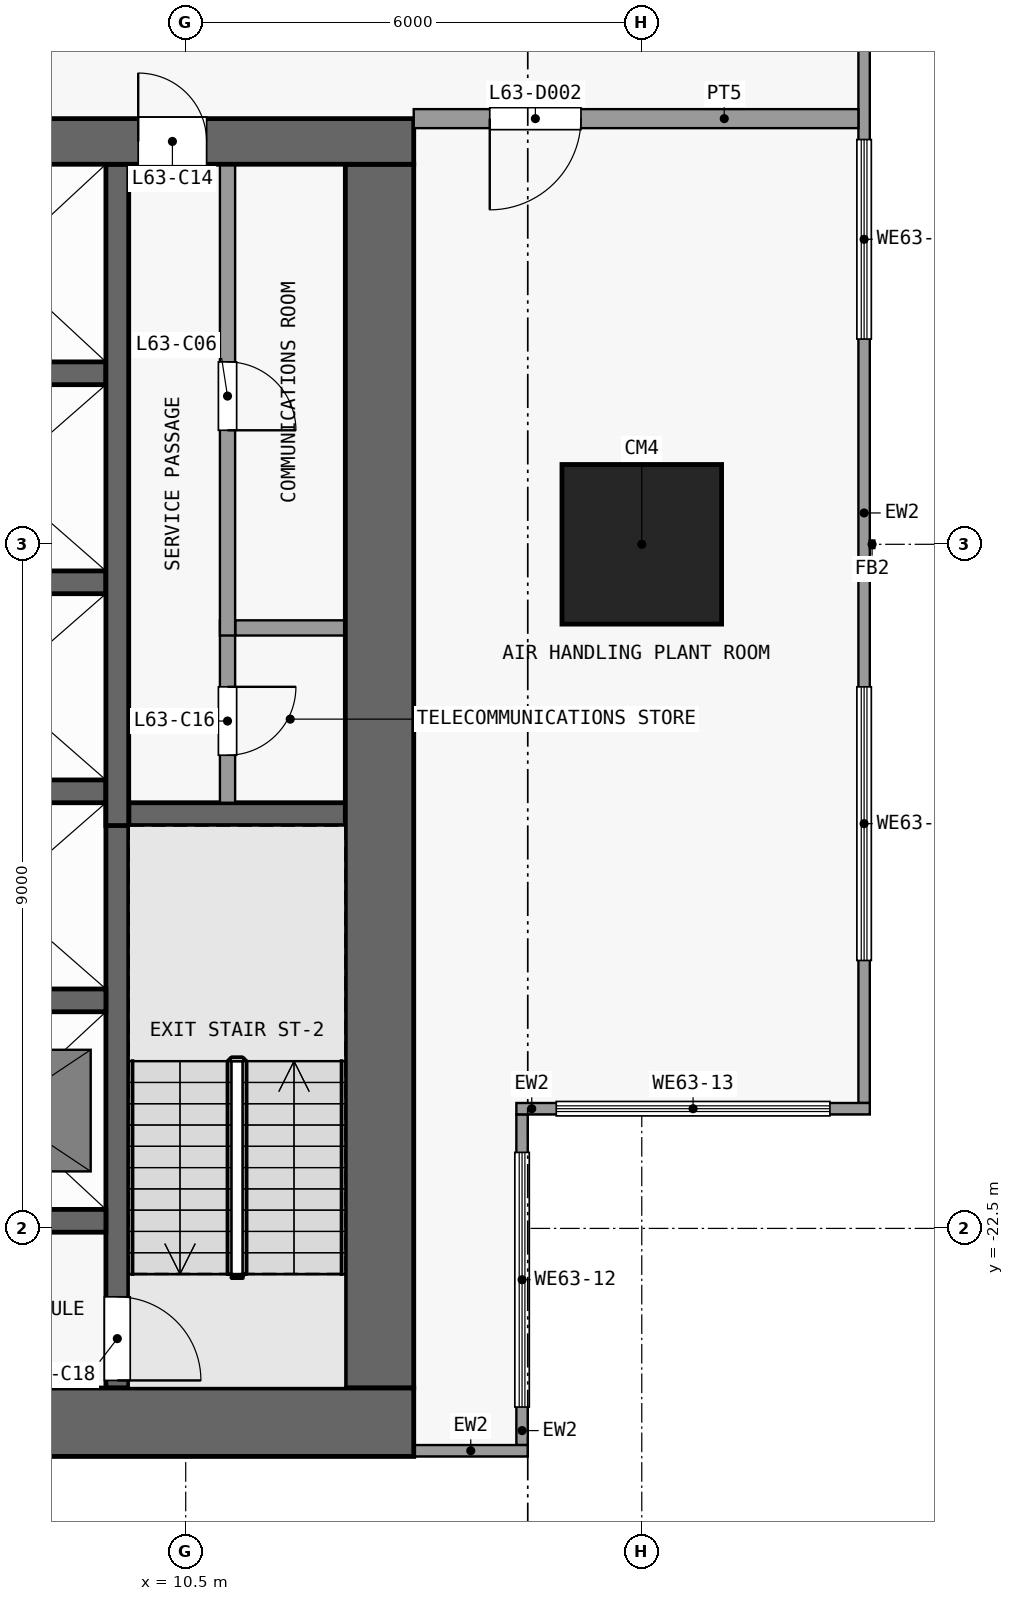
"""IFC4 building model, lengths in metres.
Left out: names, types, materials, properties, quantities, classifications, styles, units other than length and angle.
Written with IfcOpenShell. Run it as: python <this file> out.ifc"""

import sys

from ifc_helpers import new_model, si_unit, direction, frame, frame_2d, origin, origin_2d, place, context, subcontext, project, spatial, rectangle, extrude, element, fill, save


model = new_model("IFC4")
c1 = context("Model", 3, precision=1e-05, world=origin(), true_north=direction((0.0, 1.0)))
c2 = subcontext(c1, "Body", "Model", "MODEL_VIEW")
j1 = project(units=[si_unit("LENGTHUNIT", "METRE"), si_unit("PLANEANGLEUNIT", "RADIAN")], contexts=[c1])
p1 = place(None, origin())
s1 = spatial("IfcSite", under=j1, at=p1, CompositionType="ELEMENT")
p2 = place(p1, origin())
s2 = spatial("IfcBuilding", under=s1, at=p2, CompositionType="ELEMENT")
p3 = place(p2, frame((0.0, 0.0, 248.3)))
s3 = spatial("IfcBuildingStorey", under=s2, at=p3, CompositionType="ELEMENT", Elevation=248.3)
p4 = place(p3, frame((16.5, -13.5, 0.0), z_axis=(0.0, 0.0, 1.0), x_axis=(1.0, 0.0, 0.0)))
e1 = element("IfcColumn", 1, at=p4, inside=s3, PredefinedType="COLUMN", context=c2, shape_type="SweptSolid", body=[
    extrude(rectangle(XDim=2.1, YDim=2.1, at=origin_2d()), origin(), (0.0, 0.0, 1.0), 7.2),
])
p5 = place(p3, frame((-13.5, -25.05, 0.0), z_axis=(0.0, 0.0, 1.0), x_axis=(1.0, 0.0, 0.0)))
e2 = element("IfcWall", 2, at=p5, inside=s3, PredefinedType="SHEAR", context=c2, shape_type="SweptSolid", body=[
    extrude(rectangle(XDim=27.0, YDim=0.9, at=frame_2d((13.5, 0.0))), origin(), (0.0, 0.0, 1.0), 6.9),
])
p6 = place(p3, frame((-13.5, -8.2, 0.0), z_axis=(0.0, 0.0, 1.0), x_axis=(1.0, 0.0, 0.0)))
e3 = element("IfcWall", 3, at=p6, inside=s3, PredefinedType="SHEAR", context=c2, shape_type="SweptSolid", body=[
    extrude(rectangle(XDim=27.0, YDim=0.6, at=frame_2d((13.5, 0.0))), origin(), (0.0, 0.0, 1.0), 6.9),
])
p7 = place(p6, frame((7.8, 0.0, 0.0)))
e4 = element("IfcOpeningElement", 4, at=p7, cuts=e3, PredefinedType="OPENING", context=c2, shape_type="SweptSolid", body=[
    extrude(rectangle(XDim=1.8, YDim=2.1, at=frame_2d((0.9, 1.05))), frame((0.0, 0.31, 0.0), z_axis=(0.0, -1.0, 0.0), x_axis=(1.0, 0.0, 0.0)), (0.0, 0.0, 1.0), 0.62),
])
p8 = place(p6, frame((17.4, 0.0, 0.0)))
e5 = element("IfcOpeningElement", 5, at=p8, cuts=e3, PredefinedType="OPENING", context=c2, shape_type="SweptSolid", body=[
    extrude(rectangle(XDim=1.8, YDim=2.1, at=frame_2d((0.9, 1.05))), frame((0.0, 0.31, 0.0), z_axis=(0.0, -1.0, 0.0), x_axis=(1.0, 0.0, 0.0)), (0.0, 0.0, 1.0), 0.62),
])
p9 = place(p6, frame((1.725, 0.0, 0.0)))
e6 = element("IfcOpeningElement", 6, at=p9, cuts=e3, PredefinedType="OPENING", context=c2, shape_type="SweptSolid", body=[
    extrude(rectangle(XDim=1.2, YDim=2.1, at=frame_2d((0.6, 1.05))), frame((0.0, 0.31, 0.0), z_axis=(0.0, -1.0, 0.0), x_axis=(1.0, 0.0, 0.0)), (0.0, 0.0, 1.0), 0.62),
])
p10 = place(p6, frame((23.375, 0.0, 0.0)))
e7 = element("IfcOpeningElement", 7, at=p10, cuts=e3, PredefinedType="OPENING", context=c2, shape_type="SweptSolid", body=[
    extrude(rectangle(XDim=0.9, YDim=2.1, at=frame_2d((0.45, 1.05))), frame((0.0, 0.31, 0.0), z_axis=(0.0, -1.0, 0.0), x_axis=(1.0, 0.0, 0.0)), (0.0, 0.0, 1.0), 0.62),
])
p11 = place(p3, frame((13.05, -24.6, 0.0), z_axis=(0.0, 0.0, 1.0), x_axis=(0.0, 1.0, 0.0)))
e8 = element("IfcWall", 8, at=p11, inside=s3, PredefinedType="SHEAR", context=c2, shape_type="SweptSolid", body=[
    extrude(rectangle(XDim=16.1, YDim=0.9, at=frame_2d((8.05, 0.0))), origin(), (0.0, 0.0, 1.0), 6.9),
])
for number, where, z_axis, x_axis in (
    (9, (6.65, -22.4, 0.0), (0.0, 0.0, 1.0), (1.0, 0.0, 0.0)),
    (10, (6.65, -19.5, 0.0), (0.0, 0.0, 1.0), (1.0, 0.0, 0.0)),
):
    element("IfcWall", number, at=place(p3, frame(where, z_axis=z_axis, x_axis=x_axis)), inside=s3, PredefinedType="SHEAR", context=c2, shape_type="SweptSolid", body=[
        extrude(rectangle(XDim=2.8, YDim=0.3, at=frame_2d((1.4, 0.0))), origin(), (0.0, 0.0, 1.0), 6.9),
    ])
p12 = place(p3, frame((9.75, -17.05, 0.0), z_axis=(0.0, 0.0, 1.0), x_axis=(1.0, 0.0, 0.0)))
e11 = element("IfcWall", 11, at=p12, inside=s3, PredefinedType="SHEAR", context=c2, shape_type="SweptSolid", body=[
    extrude(rectangle(XDim=2.85, YDim=0.3, at=frame_2d((1.425, 0.0))), origin(), (0.0, 0.0, 1.0), 6.9),
])
p13 = place(p3, frame((6.65, -16.75, 0.0), z_axis=(0.0, 0.0, 1.0), x_axis=(1.0, 0.0, 0.0)))
e12 = element("IfcWall", 12, at=p13, inside=s3, PredefinedType="SHEAR", context=c2, shape_type="SweptSolid", body=[
    extrude(rectangle(XDim=2.8, YDim=0.3, at=frame_2d((1.4, 0.0))), origin(), (0.0, 0.0, 1.0), 6.9),
])
p14 = place(p3, frame((11.15, -14.6, 0.0), z_axis=(0.0, 0.0, 1.0), x_axis=(1.0, 0.0, 0.0)))
e13 = element("IfcWall", 13, at=p14, inside=s3, PredefinedType="PARTITIONING", context=c2, shape_type="SweptSolid", body=[
    extrude(rectangle(XDim=1.45, YDim=0.2, at=frame_2d((0.725, 0.0))), origin(), (0.0, 0.0, 1.0), 6.9),
])
for number, where, z_axis, x_axis in (
    (14, (6.65, -14.0, 0.0), (0.0, 0.0, 1.0), (1.0, 0.0, 0.0)),
    (15, (6.65, -11.25, 0.0), (0.0, 0.0, 1.0), (1.0, 0.0, 0.0)),
):
    element("IfcWall", number, at=place(p3, frame(where, z_axis=z_axis, x_axis=x_axis)), inside=s3, PredefinedType="SHEAR", context=c2, shape_type="SweptSolid", body=[
        extrude(rectangle(XDim=2.8, YDim=0.3, at=frame_2d((1.4, 0.0))), origin(), (0.0, 0.0, 1.0), 6.9),
    ])
p15 = place(p3, frame((9.6, -16.9, 0.0), z_axis=(0.0, 0.0, 1.0), x_axis=(0.0, -1.0, 0.0)))
e16 = element("IfcWall", 16, at=p15, inside=s3, PredefinedType="SHEAR", context=c2, shape_type="SweptSolid", body=[
    extrude(rectangle(XDim=7.7, YDim=0.3, at=frame_2d((3.85, 0.0))), origin(), (0.0, 0.0, 1.0), 6.9),
])
p16 = place(p15, frame((6.5, 0.0, 0.0)))
e17 = element("IfcOpeningElement", 17, at=p16, cuts=e16, PredefinedType="OPENING", context=c2, shape_type="SweptSolid", body=[
    extrude(rectangle(XDim=1.1, YDim=2.1, at=frame_2d((0.55, 1.05))), frame((0.0, 0.16, 0.0), z_axis=(0.0, -1.0, 0.0), x_axis=(1.0, 0.0, 0.0)), (0.0, 0.0, 1.0), 0.32),
])
p17 = place(p3, frame((9.6, -17.2, 0.0), z_axis=(0.0, 0.0, 1.0), x_axis=(0.0, 1.0, 0.0)))
e18 = element("IfcWall", 18, at=p17, inside=s3, PredefinedType="SHEAR", context=c2, shape_type="SweptSolid", body=[
    extrude(rectangle(XDim=8.7, YDim=0.3, at=frame_2d((4.35, 0.0))), origin(), (0.0, 0.0, 1.0), 6.9),
])
p18 = place(p3, frame((11.05, -14.5, 0.0), z_axis=(0.0, 0.0, 1.0), x_axis=(0.0, -1.0, 0.0)))
e19 = element("IfcWall", 19, at=p18, inside=s3, PredefinedType="PARTITIONING", context=c2, shape_type="SweptSolid", body=[
    extrude(rectangle(XDim=2.4, YDim=0.2, at=frame_2d((1.2, 0.0))), origin(), (0.0, 0.0, 1.0), 6.9),
])
p19 = place(p18, frame((0.875, 0.0, 0.0)))
e20 = element("IfcOpeningElement", 20, at=p19, cuts=e19, PredefinedType="OPENING", context=c2, shape_type="SweptSolid", body=[
    extrude(rectangle(XDim=0.9, YDim=2.1, at=frame_2d((0.45, 1.05))), frame((0.0, 0.11, 0.0), z_axis=(0.0, -1.0, 0.0), x_axis=(1.0, 0.0, 0.0)), (0.0, 0.0, 1.0), 0.22),
])
p20 = place(p3, frame((11.05, -8.5, 0.0), z_axis=(0.0, 0.0, 1.0), x_axis=(0.0, -1.0, 0.0)))
e21 = element("IfcWall", 21, at=p20, inside=s3, PredefinedType="PARTITIONING", context=c2, shape_type="SweptSolid", body=[
    extrude(rectangle(XDim=6.2, YDim=0.2, at=frame_2d((3.1, 0.0))), origin(), (0.0, 0.0, 1.0), 6.9),
])
p21 = place(p20, frame((2.6, 0.0, 0.0)))
e22 = element("IfcOpeningElement", 22, at=p21, cuts=e21, PredefinedType="OPENING", context=c2, shape_type="SweptSolid", body=[
    extrude(rectangle(XDim=0.9, YDim=2.1, at=frame_2d((0.45, 1.05))), frame((0.0, 0.11, 0.0), z_axis=(0.0, -1.0, 0.0), x_axis=(1.0, 0.0, 0.0)), (0.0, 0.0, 1.0), 0.22),
])
p22 = place(p3, frame((19.425, -4.5, 0.0), z_axis=(0.0, 0.0, 1.0), x_axis=(0.0, -1.0, 0.0)))
e23 = element("IfcWall", 23, at=p22, inside=s3, PredefinedType="SOLIDWALL", context=c2, shape_type="SweptSolid", body=[
    extrude(rectangle(XDim=16.35, YDim=0.15, at=frame_2d((8.175, 0.0))), origin(), (0.0, 0.0, 1.0), 6.9),
])
p23 = place(p22, frame((10.875, 0.0, 1.2)))
e24 = element("IfcOpeningElement", 24, at=p23, cuts=e23, PredefinedType="OPENING", context=c2, shape_type="SweptSolid", body=[
    extrude(rectangle(XDim=3.6, YDim=3.0, at=frame_2d((1.8, 1.5))), frame((0.0, 0.085, 0.0), z_axis=(0.0, -1.0, 0.0), x_axis=(1.0, 0.0, 0.0)), (0.0, 0.0, 1.0), 0.17),
])
p24 = place(p22, frame((3.675, 0.0, 1.2)))
e25 = element("IfcOpeningElement", 25, at=p24, cuts=e23, PredefinedType="OPENING", context=c2, shape_type="SweptSolid", body=[
    extrude(rectangle(XDim=2.625, YDim=3.0, at=frame_2d((1.312, 1.5))), frame((0.0, 0.085, 0.0), z_axis=(0.0, -1.0, 0.0), x_axis=(1.0, 0.0, 0.0)), (0.0, 0.0, 1.0), 0.17),
])
p25 = place(p3, frame((15.0, -25.425, 0.0), z_axis=(0.0, 0.0, 1.0), x_axis=(-1.0, 0.0, 0.0)))
e26 = element("IfcWall", 26, at=p25, inside=s3, PredefinedType="SOLIDWALL", context=c2, shape_type="SweptSolid", body=[
    extrude(rectangle(XDim=1.5, YDim=0.15, at=frame_2d((0.75, 0.0))), origin(), (0.0, 0.0, 1.0), 6.9),
])
p26 = place(p3, frame((14.925, -21.0, 0.0), z_axis=(0.0, 0.0, 1.0), x_axis=(0.0, -1.0, 0.0)))
e27 = element("IfcWall", 27, at=p26, inside=s3, PredefinedType="SOLIDWALL", context=c2, shape_type="SweptSolid", body=[
    extrude(rectangle(XDim=4.35, YDim=0.15, at=frame_2d((2.175, 0.0))), origin(), (0.0, 0.0, 1.0), 6.9),
])
p27 = place(p26, frame((0.5, 0.0, 1.2)))
e28 = element("IfcOpeningElement", 28, at=p27, cuts=e27, PredefinedType="OPENING", context=c2, shape_type="SweptSolid", body=[
    extrude(rectangle(XDim=3.35, YDim=3.0, at=frame_2d((1.675, 1.5))), frame((0.0, 0.085, 0.0), z_axis=(0.0, -1.0, 0.0), x_axis=(1.0, 0.0, 0.0)), (0.0, 0.0, 1.0), 0.17),
])
p28 = place(p3, frame((19.5, -20.925, 0.0), z_axis=(0.0, 0.0, 1.0), x_axis=(-1.0, 0.0, 0.0)))
e29 = element("IfcWall", 29, at=p28, inside=s3, PredefinedType="SOLIDWALL", context=c2, shape_type="SweptSolid", body=[
    extrude(rectangle(XDim=4.65, YDim=0.15, at=frame_2d((2.325, 0.0))), origin(), (0.0, 0.0, 1.0), 6.9),
])
p29 = place(p28, frame((0.525, 0.0, 1.2)))
e30 = element("IfcOpeningElement", 30, at=p29, cuts=e29, PredefinedType="OPENING", context=c2, shape_type="SweptSolid", body=[
    extrude(rectangle(XDim=3.6, YDim=3.0, at=frame_2d((1.8, 1.5))), frame((0.0, 0.085, 0.0), z_axis=(0.0, -1.0, 0.0), x_axis=(1.0, 0.0, 0.0)), (0.0, 0.0, 1.0), 0.17),
])
p30 = place(p3, frame((13.5, -7.9, 0.0), z_axis=(0.0, 0.0, 1.0), x_axis=(1.0, 0.0, 0.0)))
e31 = element("IfcWall", 31, at=p30, inside=s3, PredefinedType="PARTITIONING", context=c2, shape_type="SweptSolid", body=[
    extrude(rectangle(XDim=5.85, YDim=0.25, at=frame_2d((2.925, 0.0))), origin(), (0.0, 0.0, 1.0), 6.9),
])
p31 = place(p30, frame((1.0, 0.0, 0.0)))
e32 = element("IfcOpeningElement", 32, at=p31, cuts=e31, PredefinedType="OPENING", context=c2, shape_type="SweptSolid", body=[
    extrude(rectangle(XDim=1.2, YDim=2.1, at=frame_2d((0.6, 1.05))), frame((0.0, 0.135, 0.0), z_axis=(0.0, -1.0, 0.0), x_axis=(1.0, 0.0, 0.0)), (0.0, 0.0, 1.0), 0.27),
])
p32 = place(p21, origin())
e33 = element("IfcDoor", 33, at=p32, inside=s3, OperationType="SINGLE_SWING_RIGHT", PredefinedType="DOOR", context=c2, shape_type="SweptSolid", body=[
    extrude(rectangle(XDim=0.9, YDim=2.1, at=frame_2d((0.45, 1.05))), frame((0.0, 0.025, 0.0), z_axis=(0.0, -1.0, 0.0), x_axis=(1.0, 0.0, 0.0)), (0.0, 0.0, 1.0), 0.05),
])
fill(e22, e33)
p33 = place(p10, origin())
e34 = element("IfcDoor", 34, at=p33, inside=s3, OperationType="SINGLE_SWING_LEFT", PredefinedType="DOOR", context=c2, shape_type="SweptSolid", body=[
    extrude(rectangle(XDim=0.9, YDim=2.1, at=frame_2d((0.45, 1.05))), frame((0.0, 0.025, 0.0), z_axis=(0.0, -1.0, 0.0), x_axis=(1.0, 0.0, 0.0)), (0.0, 0.0, 1.0), 0.05),
])
fill(e7, e34)
p34 = place(p19, origin())
e35 = element("IfcDoor", 35, at=p34, inside=s3, OperationType="SINGLE_SWING_LEFT", PredefinedType="DOOR", context=c2, shape_type="SweptSolid", body=[
    extrude(rectangle(XDim=0.9, YDim=2.1, at=frame_2d((0.45, 1.05))), frame((0.0, 0.025, 0.0), z_axis=(0.0, -1.0, 0.0), x_axis=(1.0, 0.0, 0.0)), (0.0, 0.0, 1.0), 0.05),
])
fill(e20, e35)
p35 = place(p16, origin())
e36 = element("IfcDoor", 36, at=p35, inside=s3, OperationType="SINGLE_SWING_RIGHT", PredefinedType="DOOR", context=c2, shape_type="SweptSolid", body=[
    extrude(rectangle(XDim=1.1, YDim=2.1, at=frame_2d((0.55, 1.05))), frame((0.0, 0.025, 0.0), z_axis=(0.0, -1.0, 0.0), x_axis=(1.0, 0.0, 0.0)), (0.0, 0.0, 1.0), 0.05),
])
fill(e17, e36)
p36 = place(p23, origin())
e37 = element("IfcWindow", 37, at=p36, inside=s3, PartitioningType="SINGLE_PANEL", PredefinedType="WINDOW", context=c2, shape_type="SweptSolid", body=[
    extrude(rectangle(XDim=3.6, YDim=3.0, at=frame_2d((1.8, 1.5))), frame((0.0, 0.03, 0.0), z_axis=(0.0, -1.0, 0.0), x_axis=(1.0, 0.0, 0.0)), (0.0, 0.0, 1.0), 0.06),
])
fill(e24, e37)
p37 = place(p24, origin())
e38 = element("IfcWindow", 38, at=p37, inside=s3, PartitioningType="SINGLE_PANEL", PredefinedType="WINDOW", context=c2, shape_type="SweptSolid", body=[
    extrude(rectangle(XDim=2.625, YDim=3.0, at=frame_2d((1.312, 1.5))), frame((0.0, 0.03, 0.0), z_axis=(0.0, -1.0, 0.0), x_axis=(1.0, 0.0, 0.0)), (0.0, 0.0, 1.0), 0.06),
])
fill(e25, e38)
p38 = place(p27, origin())
e39 = element("IfcWindow", 39, at=p38, inside=s3, PartitioningType="SINGLE_PANEL", PredefinedType="WINDOW", context=c2, shape_type="SweptSolid", body=[
    extrude(rectangle(XDim=3.35, YDim=3.0, at=frame_2d((1.675, 1.5))), frame((0.0, 0.03, 0.0), z_axis=(0.0, -1.0, 0.0), x_axis=(1.0, 0.0, 0.0)), (0.0, 0.0, 1.0), 0.06),
])
fill(e28, e39)
p39 = place(p29, origin())
e40 = element("IfcWindow", 40, at=p39, inside=s3, PartitioningType="SINGLE_PANEL", PredefinedType="WINDOW", context=c2, shape_type="SweptSolid", body=[
    extrude(rectangle(XDim=3.6, YDim=3.0, at=frame_2d((1.8, 1.5))), frame((0.0, 0.03, 0.0), z_axis=(0.0, -1.0, 0.0), x_axis=(1.0, 0.0, 0.0)), (0.0, 0.0, 1.0), 0.06),
])
fill(e30, e40)
p40 = place(p31, origin())
e41 = element("IfcDoor", 41, at=p40, inside=s3, OperationType="SINGLE_SWING_LEFT", PredefinedType="DOOR", context=c2, shape_type="SweptSolid", body=[
    extrude(rectangle(XDim=1.2, YDim=2.1, at=frame_2d((0.6, 1.05))), frame((0.0, 0.025, 0.0), z_axis=(0.0, -1.0, 0.0), x_axis=(1.0, 0.0, 0.0)), (0.0, 0.0, 1.0), 0.05),
])
fill(e32, e41)
save(model, sys.argv[1])
